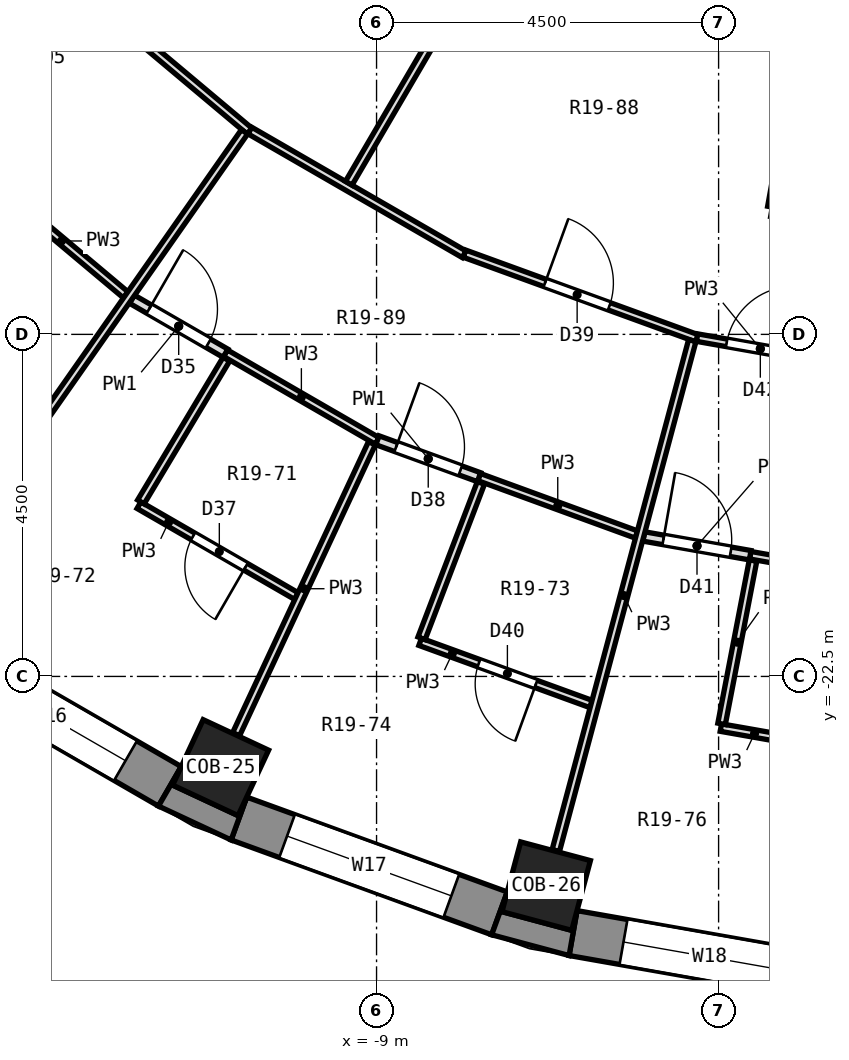
"""IFC4 building model, lengths in metres.
Left out: names, types, materials, properties, quantities, classifications, styles, units other than length and angle.
Written with IfcOpenShell. Run it as: python <this file> out.ifc"""

import sys

from ifc_helpers import new_model, si_unit, direction, frame, frame_2d, origin, origin_2d, place, context, subcontext, project, spatial, polyline, rectangle, outline, extrude, element, fill, save


model = new_model("IFC4")
c1 = context("Model", 3, precision=1e-05, world=origin(), true_north=direction((0.0, 1.0)))
c2 = subcontext(c1, "Body", "Model", "MODEL_VIEW")
j1 = project(units=[si_unit("LENGTHUNIT", "METRE"), si_unit("PLANEANGLEUNIT", "RADIAN")], contexts=[c1])
p1 = place(None, origin())
s1 = spatial("IfcSite", under=j1, at=p1, CompositionType="ELEMENT")
p2 = place(p1, origin())
s2 = spatial("IfcBuilding", under=s1, at=p2, CompositionType="ELEMENT")
p3 = place(p2, frame((0.0, 0.0, 111.7)))
s3 = spatial("IfcBuildingStorey", under=s2, at=p3, CompositionType="ELEMENT", Elevation=111.7)
for number, where, z_axis, x_axis in (
    (1, (-11.052, -23.7, 0.0), (0.0, 0.0, 1.0), (-0.423, -0.906, 0.0)),
    (2, (-6.768, -25.259, 0.0), (0.0, 0.0, 1.0), (-0.259, -0.966, 0.0)),
):
    element("IfcColumn", number, at=place(p3, frame(where, z_axis=z_axis, x_axis=x_axis)), inside=s3, PredefinedType="COLUMN", context=c2, shape_type="SweptSolid", body=[
        extrude(rectangle(XDim=0.95, YDim=0.95, at=origin_2d()), origin(), (0.0, 0.0, 1.0), 3.3),
    ])
p4 = place(p3, frame((-14.878, -22.122, 0.0), z_axis=(0.0, 0.0, 1.0), x_axis=(0.866051847062, -0.499954196102, 0.0)))
e3 = element("IfcWall", 3, at=p4, inside=s3, PredefinedType="SOLIDWALL", context=c2, shape_type="SweptSolid", body=[
    extrude(rectangle(XDim=3.648, YDim=0.6, at=frame_2d((1.824, 0.0))), origin(), (0.0, 0.0, 1.0), 2.8),
])
p5 = place(p4, frame((0.674, 0.0, 0.9)))
e4 = element("IfcOpeningElement", 4, at=p5, cuts=e3, PredefinedType="OPENING", context=c2, shape_type="SweptSolid", body=[
    extrude(rectangle(XDim=2.3, YDim=1.8, at=frame_2d((1.15, 0.9))), frame((0.0, 0.312, 0.0), z_axis=(0.0, -1.0, 0.0), x_axis=(1.0, 0.0, 0.0)), (0.0, 0.0, 1.0), 0.624),
])
p6 = place(p3, frame((-10.811, -24.369, 0.0), z_axis=(0.0, 0.0, 1.0), x_axis=(0.939703505393, -0.341990236633, 0.0)))
e5 = element("IfcWall", 5, at=p6, inside=s3, PredefinedType="SOLIDWALL", context=c2, shape_type="SweptSolid", body=[
    extrude(rectangle(XDim=3.648, YDim=0.6, at=frame_2d((1.824, 0.0))), origin(), (0.0, 0.0, 1.0), 2.8),
])
p7 = place(p6, frame((0.674, 0.0, 0.9)))
e6 = element("IfcOpeningElement", 6, at=p7, cuts=e5, PredefinedType="OPENING", context=c2, shape_type="SweptSolid", body=[
    extrude(rectangle(XDim=2.3, YDim=1.8, at=frame_2d((1.15, 0.9))), frame((0.0, 0.312, 0.0), z_axis=(0.0, -1.0, 0.0), x_axis=(1.0, 0.0, 0.0)), (0.0, 0.0, 1.0), 0.624),
])
p8 = place(p3, frame((-6.415, -25.876, 0.0), z_axis=(0.0, 0.0, 1.0), x_axis=(0.984803764455, -0.173670796382, 0.0)))
e7 = element("IfcWall", 7, at=p8, inside=s3, PredefinedType="SOLIDWALL", context=c2, shape_type="SweptSolid", body=[
    extrude(rectangle(XDim=3.648, YDim=0.6, at=frame_2d((1.824, 0.0))), origin(), (0.0, 0.0, 1.0), 2.8),
])
p9 = place(p8, frame((0.674, 0.0, 0.9)))
e8 = element("IfcOpeningElement", 8, at=p9, cuts=e7, PredefinedType="OPENING", context=c2, shape_type="SweptSolid", body=[
    extrude(rectangle(XDim=2.3, YDim=1.8, at=frame_2d((1.15, 0.9))), frame((0.0, 0.312, 0.0), z_axis=(0.0, -1.0, 0.0), x_axis=(1.0, 0.0, 0.0)), (0.0, 0.0, 1.0), 0.624),
])
p10 = place(p3, origin())
e9 = element("IfcWall", 9, at=p10, inside=s3, PredefinedType="SOLIDWALL", context=c2, shape_type="SweptSolid", body=[
    extrude(outline(polyline([(-10.913, -24.651), (-10.708, -24.087), (-10.822, -24.331), (-11.683, -23.93), (-11.569, -23.686), (-11.869, -24.206), (-10.913, -24.651)])), origin(), (0.0, 0.0, 1.0), 2.8),
])
p11 = place(p3, origin())
e10 = element("IfcWall", 10, at=p11, inside=s3, PredefinedType="SOLIDWALL", context=c2, shape_type="SweptSolid", body=[
    extrude(outline(polyline([(-7.486, -25.899), (-6.467, -26.172), (-6.363, -25.581), (-6.432, -25.841), (-7.35, -25.595), (-7.28, -25.335), (-7.486, -25.899)])), origin(), (0.0, 0.0, 1.0), 2.8),
])
p12 = place(p3, frame((-13.989, -16.063, 0.0), z_axis=(0.0, 0.0, 1.0), x_axis=(0.766038513467, -0.642794676305, 0.0)))
e11 = element("IfcWall", 11, at=p12, inside=s3, PredefinedType="PARTITIONING", context=c2, shape_type="SweptSolid", body=[
    extrude(rectangle(XDim=2.205, YDim=0.1, at=frame_2d((1.103, 0.0))), origin(), (0.0, 0.0, 1.0), 2.8),
])
p13 = place(p3, frame((-13.164, -13.234, 0.0), z_axis=(0.0, 0.0, 1.0), x_axis=(0.766028328168, -0.642806814248, 0.0)))
e12 = element("IfcWall", 12, at=p13, inside=s3, PredefinedType="PARTITIONING", context=c2, shape_type="SweptSolid", body=[
    extrude(rectangle(XDim=3.255, YDim=0.1, at=frame_2d((1.628, 0.0))), origin(), (0.0, 0.0, 1.0), 2.8),
])
p14 = place(p3, frame((-12.126, -20.247, 0.0), z_axis=(0.0, 0.0, 1.0), x_axis=(0.866042831623, -0.499969812883, 0.0)))
e13 = element("IfcWall", 13, at=p14, inside=s3, PredefinedType="PARTITIONING", context=c2, shape_type="SweptSolid", body=[
    extrude(rectangle(XDim=2.392, YDim=0.1, at=frame_2d((1.196, 0.0))), origin(), (0.0, 0.0, 1.0), 2.8),
])
p15 = place(p14, frame((0.821, 0.0, 0.0)))
e14 = element("IfcOpeningElement", 14, at=p15, cuts=e13, PredefinedType="OPENING", context=c2, shape_type="SweptSolid", body=[
    extrude(rectangle(XDim=0.8, YDim=2.1, at=frame_2d((0.4, 1.05))), frame((0.0, 0.062, 0.0), z_axis=(0.0, -1.0, 0.0), x_axis=(1.0, 0.0, 0.0)), (0.0, 0.0, 1.0), 0.124),
])
p16 = place(p3, frame((-10.987, -18.248, 0.0), z_axis=(0.0, 0.0, 1.0), x_axis=(0.865887497708, -0.500238784294, 0.0)))
e15 = element("IfcWall", 15, at=p16, inside=s3, PredefinedType="PARTITIONING", context=c2, shape_type="SweptSolid", body=[
    extrude(rectangle(XDim=2.305, YDim=0.1, at=frame_2d((1.153, 0.0))), origin(), (0.0, 0.0, 1.0), 2.8),
])
p17 = place(p3, frame((-12.219, -17.537, 0.0), z_axis=(0.0, 0.0, 1.0), x_axis=(0.866036909293, -0.499980071345, 0.0)))
e16 = element("IfcWall", 16, at=p17, inside=s3, PredefinedType="PARTITIONING", context=c2, shape_type="SweptSolid", body=[
    extrude(rectangle(XDim=1.422, YDim=0.125, at=frame_2d((0.711, 0.0))), origin(), (0.0, 0.0, 1.0), 2.8),
])
p18 = place(p17, frame((0.261, 0.0, 0.0)))
e17 = element("IfcOpeningElement", 17, at=p18, cuts=e16, PredefinedType="OPENING", context=c2, shape_type="SweptSolid", body=[
    extrude(rectangle(XDim=0.9, YDim=2.1, at=frame_2d((0.45, 1.05))), frame((0.0, 0.074, 0.0), z_axis=(0.0, -1.0, 0.0), x_axis=(1.0, 0.0, 0.0)), (0.0, 0.0, 1.0), 0.149),
])
p19 = place(p3, frame((-10.666, -15.319, 0.0), z_axis=(0.0, 0.0, 1.0), x_axis=(0.866019502567, -0.500010221068, 0.0)))
e18 = element("IfcWall", 18, at=p19, inside=s3, PredefinedType="PARTITIONING", context=c2, shape_type="SweptSolid", body=[
    extrude(rectangle(XDim=3.256, YDim=0.1, at=frame_2d((1.628, 0.0))), origin(), (0.0, 0.0, 1.0), 2.8),
])
p20 = place(p3, frame((-7.651, -19.877, 0.0), z_axis=(0.0, 0.0, 1.0), x_axis=(0.939404870565, -0.342809698169, 0.0)))
e19 = element("IfcWall", 19, at=p20, inside=s3, PredefinedType="PARTITIONING", context=c2, shape_type="SweptSolid", body=[
    extrude(rectangle(XDim=2.205, YDim=0.1, at=frame_2d((1.103, 0.0))), origin(), (0.0, 0.0, 1.0), 2.8),
])
p21 = place(p3, frame((-8.426, -22.045, 0.0), z_axis=(0.0, 0.0, 1.0), x_axis=(0.93973977618, -0.341890557146, 0.0)))
e20 = element("IfcWall", 20, at=p21, inside=s3, PredefinedType="PARTITIONING", context=c2, shape_type="SweptSolid", body=[
    extrude(rectangle(XDim=2.392, YDim=0.1, at=frame_2d((1.196, 0.0))), origin(), (0.0, 0.0, 1.0), 2.8),
])
p22 = place(p21, frame((0.821, 0.0, 0.0)))
e21 = element("IfcOpeningElement", 21, at=p22, cuts=e20, PredefinedType="OPENING", context=c2, shape_type="SweptSolid", body=[
    extrude(rectangle(XDim=0.8, YDim=2.1, at=frame_2d((0.4, 1.05))), frame((0.0, 0.062, 0.0), z_axis=(0.0, -1.0, 0.0), x_axis=(1.0, 0.0, 0.0)), (0.0, 0.0, 1.0), 0.124),
])
p23 = place(p3, frame((-8.988, -19.393, 0.0), z_axis=(0.0, 0.0, 1.0), x_axis=(0.939783394235, -0.341770642275, 0.0)))
e22 = element("IfcWall", 22, at=p23, inside=s3, PredefinedType="PARTITIONING", context=c2, shape_type="SweptSolid", body=[
    extrude(rectangle(XDim=1.422, YDim=0.125, at=frame_2d((0.711, 0.0))), origin(), (0.0, 0.0, 1.0), 2.8),
])
p24 = place(p23, frame((0.261, 0.0, 0.0)))
e23 = element("IfcOpeningElement", 23, at=p24, cuts=e22, PredefinedType="OPENING", context=c2, shape_type="SweptSolid", body=[
    extrude(rectangle(XDim=0.9, YDim=2.1, at=frame_2d((0.45, 1.05))), frame((0.0, 0.074, 0.0), z_axis=(0.0, -1.0, 0.0), x_axis=(1.0, 0.0, 0.0)), (0.0, 0.0, 1.0), 0.149),
])
p25 = place(p3, frame((-7.843, -16.938, 0.0), z_axis=(0.0, 0.0, 1.0), x_axis=(0.939697033511, -0.34200801922, 0.0)))
e24 = element("IfcWall", 24, at=p25, inside=s3, PredefinedType="PARTITIONING", context=c2, shape_type="SweptSolid", body=[
    extrude(rectangle(XDim=3.255, YDim=0.1, at=frame_2d((1.627, 0.0))), origin(), (0.0, 0.0, 1.0), 2.8),
])
p26 = place(p25, frame((1.127, 0.0, 0.0)))
e25 = element("IfcOpeningElement", 25, at=p26, cuts=e24, PredefinedType="OPENING", context=c2, shape_type="SweptSolid", body=[
    extrude(rectangle(XDim=0.9, YDim=2.1, at=frame_2d((0.45, 1.05))), frame((0.0, 0.062, 0.0), z_axis=(0.0, -1.0, 0.0), x_axis=(1.0, 0.0, 0.0)), (0.0, 0.0, 1.0), 0.124),
])
p27 = place(p3, frame((-4.47, -23.173, 0.0), z_axis=(0.0, 0.0, 1.0), x_axis=(0.984826665662, -0.173540884522, 0.0)))
e26 = element("IfcWall", 26, at=p27, inside=s3, PredefinedType="PARTITIONING", context=c2, shape_type="SweptSolid", body=[
    extrude(rectangle(XDim=2.393, YDim=0.1, at=frame_2d((1.197, 0.0))), origin(), (0.0, 0.0, 1.0), 2.8),
])
p28 = place(p27, frame((0.822, 0.0, 0.0)))
e27 = element("IfcOpeningElement", 27, at=p28, cuts=e26, PredefinedType="OPENING", context=c2, shape_type="SweptSolid", body=[
    extrude(rectangle(XDim=0.8, YDim=2.1, at=frame_2d((0.4, 1.05))), frame((0.0, 0.062, 0.0), z_axis=(0.0, -1.0, 0.0), x_axis=(1.0, 0.0, 0.0)), (0.0, 0.0, 1.0), 0.124),
])
p29 = place(p3, frame((-4.084, -20.905, 0.0), z_axis=(0.0, 0.0, 1.0), x_axis=(0.984796344358, -0.173712866935, 0.0)))
e28 = element("IfcWall", 28, at=p29, inside=s3, PredefinedType="PARTITIONING", context=c2, shape_type="SweptSolid", body=[
    extrude(rectangle(XDim=2.306, YDim=0.1, at=frame_2d((1.153, 0.0))), origin(), (0.0, 0.0, 1.0), 2.8),
])
p30 = place(p3, frame((-5.484, -20.659, 0.0), z_axis=(0.0, 0.0, 1.0), x_axis=(0.984828496868, -0.173530492295, 0.0)))
e29 = element("IfcWall", 29, at=p30, inside=s3, PredefinedType="PARTITIONING", context=c2, shape_type="SweptSolid", body=[
    extrude(rectangle(XDim=1.421, YDim=0.125, at=frame_2d((0.71, 0.0))), origin(), (0.0, 0.0, 1.0), 2.8),
])
p31 = place(p30, frame((0.26, 0.0, 0.0)))
e30 = element("IfcOpeningElement", 30, at=p31, cuts=e29, PredefinedType="OPENING", context=c2, shape_type="SweptSolid", body=[
    extrude(rectangle(XDim=0.9, YDim=2.1, at=frame_2d((0.45, 1.05))), frame((0.0, 0.074, 0.0), z_axis=(0.0, -1.0, 0.0), x_axis=(1.0, 0.0, 0.0)), (0.0, 0.0, 1.0), 0.149),
])
p32 = place(p3, frame((-4.783, -18.043, 0.0), z_axis=(0.0, 0.0, 1.0), x_axis=(0.98477046178, -0.173859534124, 0.0)))
e31 = element("IfcWall", 31, at=p32, inside=s3, PredefinedType="PARTITIONING", context=c2, shape_type="SweptSolid", body=[
    extrude(rectangle(XDim=1.689, YDim=0.1, at=frame_2d((0.845, 0.0))), origin(), (0.0, 0.0, 1.0), 2.8),
])
p33 = place(p32, frame((0.395, 0.0, 0.0)))
e32 = element("IfcOpeningElement", 32, at=p33, cuts=e31, PredefinedType="OPENING", context=c2, shape_type="SweptSolid", body=[
    extrude(rectangle(XDim=0.9, YDim=2.1, at=frame_2d((0.45, 1.05))), frame((0.0, 0.062, 0.0), z_axis=(0.0, -1.0, 0.0), x_axis=(1.0, 0.0, 0.0)), (0.0, 0.0, 1.0), 0.124),
])
p34 = place(p3, frame((-14.722, -21.023, 0.0), z_axis=(0.0, 0.0, 1.0), x_axis=(0.573811489918, 0.818987407741, 0.0)))
e33 = element("IfcWall", 33, at=p34, inside=s3, PredefinedType="PARTITIONING", context=c2, shape_type="SweptSolid", body=[
    extrude(rectangle(XDim=6.945, YDim=0.1, at=frame_2d((3.472, 0.0))), origin(), (0.0, 0.0, 1.0), 2.8),
])
p35 = place(p3, frame((-12.1, -20.204, 0.0), z_axis=(0.0, 0.0, 1.0), x_axis=(0.513757266297, 0.857935586933, 0.0)))
e34 = element("IfcWall", 34, at=p35, inside=s3, PredefinedType="PARTITIONING", context=c2, shape_type="SweptSolid", body=[
    extrude(rectangle(XDim=2.188, YDim=0.1, at=frame_2d((1.094, 0.0))), origin(), (0.0, 0.0, 1.0), 2.8),
])
p36 = place(p3, frame((-9.366, -16.012, 0.0), z_axis=(0.0, 0.0, 1.0), x_axis=(0.504907426376, 0.863173499819, 0.0)))
e35 = element("IfcWall", 35, at=p36, inside=s3, PredefinedType="PARTITIONING", context=c2, shape_type="SweptSolid", body=[
    extrude(rectangle(XDim=7.687, YDim=0.1, at=frame_2d((3.843, 0.0))), origin(), (0.0, 0.0, 1.0), 2.8),
])
p37 = place(p36, frame((3.4, 0.0, 0.0)))
e36 = element("IfcOpeningElement", 36, at=p37, cuts=e35, PredefinedType="OPENING", context=c2, shape_type="SweptSolid", body=[
    extrude(rectangle(XDim=0.9, YDim=2.1, at=frame_2d((0.45, 1.05))), frame((0.0, 0.062, 0.0), z_axis=(0.0, -1.0, 0.0), x_axis=(1.0, 0.0, 0.0)), (0.0, 0.0, 1.0), 0.124),
])
p38 = place(p3, frame((-10.847, -23.26, 0.0), z_axis=(0.0, 0.0, 1.0), x_axis=(0.422841161976, 0.906203813575, 0.0)))
e37 = element("IfcWall", 37, at=p38, inside=s3, PredefinedType="PARTITIONING", context=c2, shape_type="SweptSolid", body=[
    extrude(rectangle(XDim=4.224, YDim=0.1, at=frame_2d((2.112, 0.0))), origin(), (0.0, 0.0, 1.0), 2.8),
])
p39 = place(p3, frame((-8.408, -21.998, 0.0), z_axis=(0.0, 0.0, 1.0), x_axis=(0.356937039246, 0.934128444067, 0.0)))
e38 = element("IfcWall", 38, at=p39, inside=s3, PredefinedType="PARTITIONING", context=c2, shape_type="SweptSolid", body=[
    extrude(rectangle(XDim=2.188, YDim=0.1, at=frame_2d((1.094, 0.0))), origin(), (0.0, 0.0, 1.0), 2.8),
])
p40 = place(p3, frame((-6.642, -24.791, 0.0), z_axis=(0.0, 0.0, 1.0), x_axis=(0.258515851323, 0.966007015821, 0.0)))
e39 = element("IfcWall", 39, at=p40, inside=s3, PredefinedType="PARTITIONING", context=c2, shape_type="SweptSolid", body=[
    extrude(rectangle(XDim=6.945, YDim=0.1, at=frame_2d((3.473, 0.0))), origin(), (0.0, 0.0, 1.0), 2.8),
])
p41 = place(p3, frame((-4.46, -23.124, 0.0), z_axis=(0.0, 0.0, 1.0), x_axis=(0.189008785522, 0.981975396329, 0.0)))
e40 = element("IfcWall", 40, at=p41, inside=s3, PredefinedType="PARTITIONING", context=c2, shape_type="SweptSolid", body=[
    extrude(rectangle(XDim=2.188, YDim=0.1, at=frame_2d((1.094, 0.0))), origin(), (0.0, 0.0, 1.0), 2.8),
])
p42 = place(p3, frame((-3.793, -16.325, 0.0), z_axis=(0.0, 0.0, 1.0), x_axis=(0.178389527964, 0.983959946498, 0.0)))
e41 = element("IfcWall", 41, at=p42, inside=s3, PredefinedType="PARTITIONING", context=c2, shape_type="SweptSolid", body=[
    extrude(rectangle(XDim=5.936, YDim=0.125, at=frame_2d((2.968, 0.0))), origin(), (0.0, 0.0, 1.0), 2.8),
])
p43 = place(p5, origin())
e42 = element("IfcWindow", 42, at=p43, inside=s3, PartitioningType="SINGLE_PANEL", PredefinedType="WINDOW", context=c2, shape_type="SweptSolid", body=[
    extrude(rectangle(XDim=2.3, YDim=1.8, at=frame_2d((1.15, 0.9))), frame((0.0, 0.18, 0.0), z_axis=(0.0, -1.0, 0.0), x_axis=(1.0, 0.0, 0.0)), (0.0, 0.0, 1.0), 0.06),
])
fill(e4, e42)
p44 = place(p7, origin())
e43 = element("IfcWindow", 43, at=p44, inside=s3, PartitioningType="SINGLE_PANEL", PredefinedType="WINDOW", context=c2, shape_type="SweptSolid", body=[
    extrude(rectangle(XDim=2.3, YDim=1.8, at=frame_2d((1.15, 0.9))), frame((0.0, 0.18, 0.0), z_axis=(0.0, -1.0, 0.0), x_axis=(1.0, 0.0, 0.0)), (0.0, 0.0, 1.0), 0.06),
])
fill(e6, e43)
p45 = place(p9, origin())
e44 = element("IfcWindow", 44, at=p45, inside=s3, PartitioningType="SINGLE_PANEL", PredefinedType="WINDOW", context=c2, shape_type="SweptSolid", body=[
    extrude(rectangle(XDim=2.3, YDim=1.8, at=frame_2d((1.15, 0.9))), frame((0.0, 0.18, 0.0), z_axis=(0.0, -1.0, 0.0), x_axis=(1.0, 0.0, 0.0)), (0.0, 0.0, 1.0), 0.06),
])
fill(e8, e44)
p46 = place(p18, origin())
e45 = element("IfcDoor", 45, at=p46, inside=s3, OperationType="SINGLE_SWING_LEFT", PredefinedType="DOOR", context=c2, shape_type="SweptSolid", body=[
    extrude(rectangle(XDim=0.9, YDim=2.1, at=frame_2d((0.45, 1.05))), frame((0.0, 0.025, 0.0), z_axis=(0.0, -1.0, 0.0), x_axis=(1.0, 0.0, 0.0)), (0.0, 0.0, 1.0), 0.05),
])
fill(e17, e45)
p47 = place(p15, frame((0.8, 0.0, 0.0), z_axis=(0.0, 0.0, 1.0), x_axis=(-1.0, 0.0, 0.0)))
e46 = element("IfcDoor", 46, at=p47, inside=s3, OperationType="SINGLE_SWING_LEFT", PredefinedType="DOOR", context=c2, shape_type="SweptSolid", body=[
    extrude(rectangle(XDim=0.8, YDim=2.1, at=frame_2d((0.4, 1.05))), frame((0.0, 0.025, 0.0), z_axis=(0.0, -1.0, 0.0), x_axis=(1.0, 0.0, 0.0)), (0.0, 0.0, 1.0), 0.05),
])
fill(e14, e46)
p48 = place(p24, origin())
e47 = element("IfcDoor", 47, at=p48, inside=s3, OperationType="SINGLE_SWING_LEFT", PredefinedType="DOOR", context=c2, shape_type="SweptSolid", body=[
    extrude(rectangle(XDim=0.9, YDim=2.1, at=frame_2d((0.45, 1.05))), frame((0.0, 0.025, 0.0), z_axis=(0.0, -1.0, 0.0), x_axis=(1.0, 0.0, 0.0)), (0.0, 0.0, 1.0), 0.05),
])
fill(e23, e47)
p49 = place(p26, origin())
e48 = element("IfcDoor", 48, at=p49, inside=s3, OperationType="SINGLE_SWING_LEFT", PredefinedType="DOOR", context=c2, shape_type="SweptSolid", body=[
    extrude(rectangle(XDim=0.9, YDim=2.1, at=frame_2d((0.45, 1.05))), frame((0.0, 0.025, 0.0), z_axis=(0.0, -1.0, 0.0), x_axis=(1.0, 0.0, 0.0)), (0.0, 0.0, 1.0), 0.05),
])
fill(e25, e48)
p50 = place(p22, frame((0.8, 0.0, 0.0), z_axis=(0.0, 0.0, 1.0), x_axis=(-1.0, 0.0, 0.0)))
e49 = element("IfcDoor", 49, at=p50, inside=s3, OperationType="SINGLE_SWING_LEFT", PredefinedType="DOOR", context=c2, shape_type="SweptSolid", body=[
    extrude(rectangle(XDim=0.8, YDim=2.1, at=frame_2d((0.4, 1.05))), frame((0.0, 0.025, 0.0), z_axis=(0.0, -1.0, 0.0), x_axis=(1.0, 0.0, 0.0)), (0.0, 0.0, 1.0), 0.05),
])
fill(e21, e49)
p51 = place(p31, origin())
e50 = element("IfcDoor", 50, at=p51, inside=s3, OperationType="SINGLE_SWING_LEFT", PredefinedType="DOOR", context=c2, shape_type="SweptSolid", body=[
    extrude(rectangle(XDim=0.9, YDim=2.1, at=frame_2d((0.45, 1.05))), frame((0.0, 0.025, 0.0), z_axis=(0.0, -1.0, 0.0), x_axis=(1.0, 0.0, 0.0)), (0.0, 0.0, 1.0), 0.05),
])
fill(e30, e50)
p52 = place(p33, origin())
e51 = element("IfcDoor", 51, at=p52, inside=s3, OperationType="SINGLE_SWING_RIGHT", PredefinedType="DOOR", context=c2, shape_type="SweptSolid", body=[
    extrude(rectangle(XDim=0.9, YDim=2.1, at=frame_2d((0.45, 1.05))), frame((0.0, 0.025, 0.0), z_axis=(0.0, -1.0, 0.0), x_axis=(1.0, 0.0, 0.0)), (0.0, 0.0, 1.0), 0.05),
])
fill(e32, e51)
save(model, sys.argv[1])
